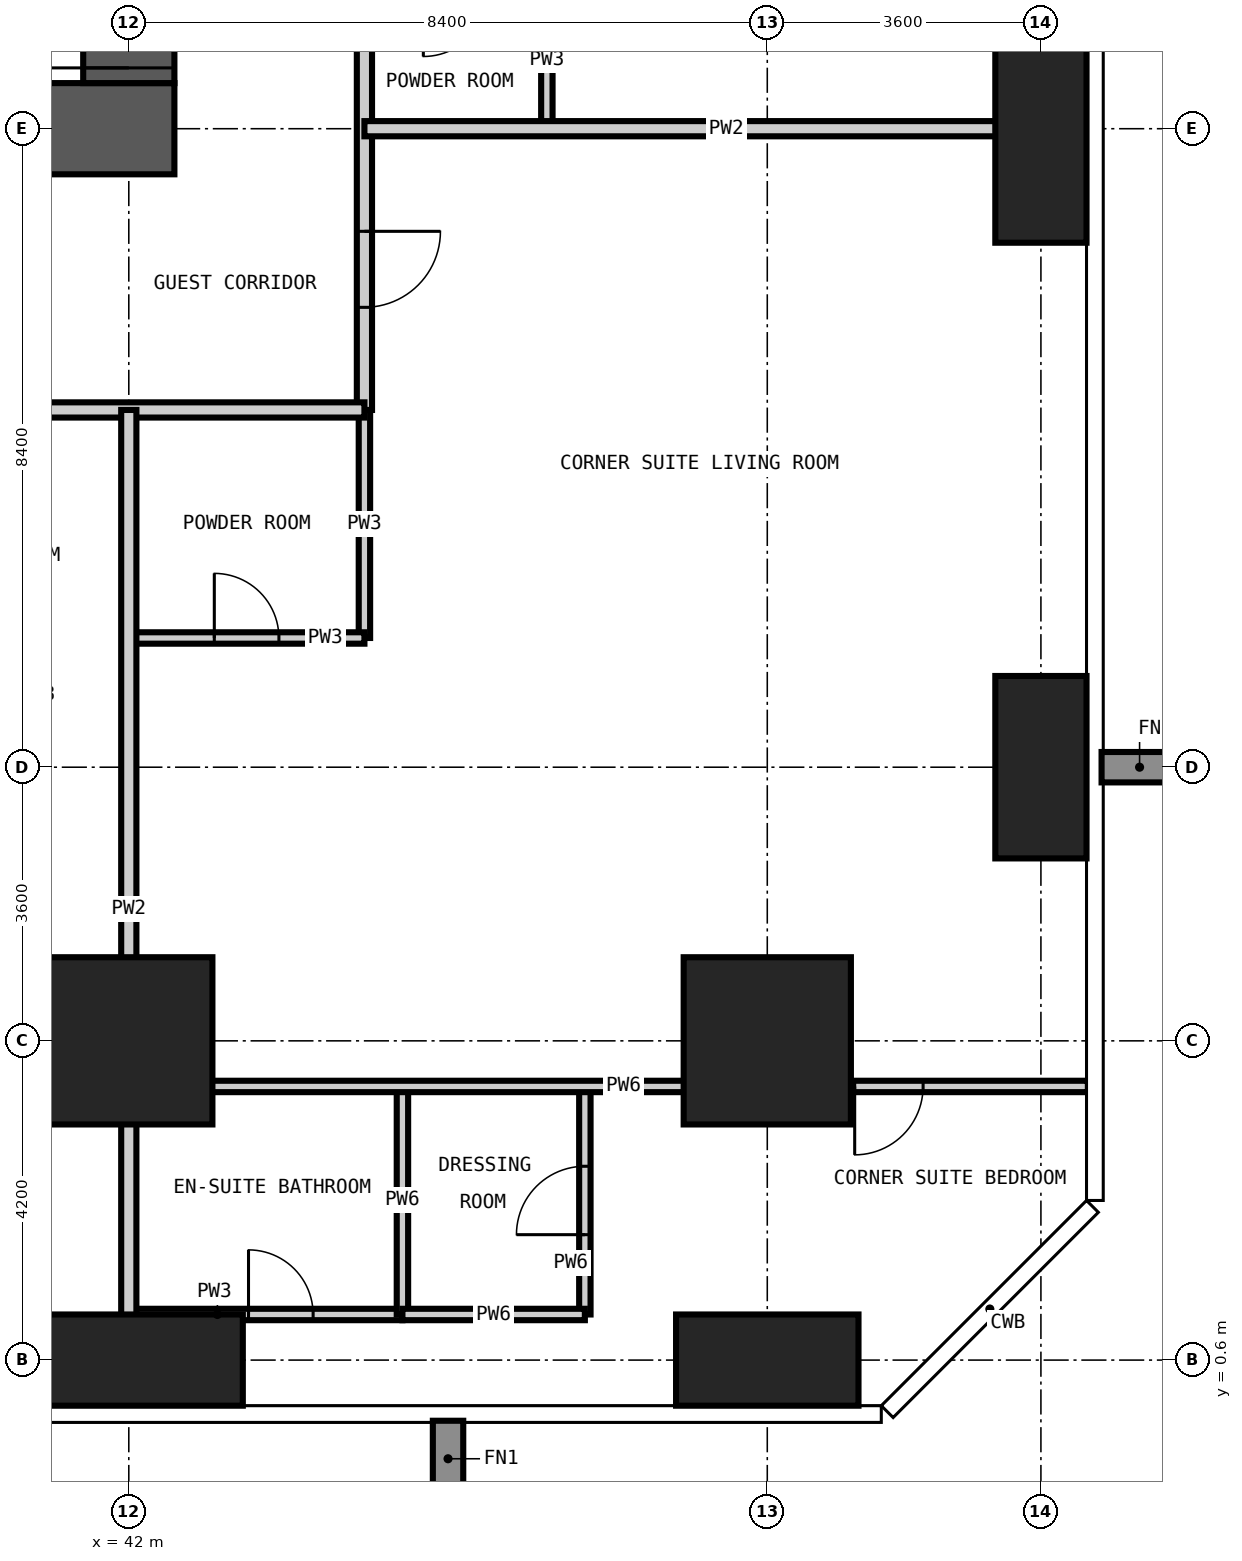
"""IFC4 building model, lengths in metres.
Left out: names, types, materials, properties, quantities, classifications, styles, units other than length and angle.
Written with IfcOpenShell. Run it as: python <this file> out.ifc"""

import sys

from ifc_helpers import new_model, si_unit, direction, frame, frame_2d, origin, origin_2d, place, context, subcontext, project, spatial, rectangle, extrude, element, fill, save


model = new_model("IFC4")
c1 = context("Model", 3, precision=1e-05, world=origin(), true_north=direction((0.0, 1.0)))
c2 = subcontext(c1, "Body", "Model", "MODEL_VIEW")
j1 = project(units=[si_unit("LENGTHUNIT", "METRE"), si_unit("PLANEANGLEUNIT", "RADIAN")], contexts=[c1])
p1 = place(None, origin())
s1 = spatial("IfcSite", under=j1, at=p1, CompositionType="ELEMENT")
p2 = place(p1, origin())
s2 = spatial("IfcBuilding", under=s1, at=p2, CompositionType="ELEMENT")
p3 = place(p2, frame((0.0, 0.0, 144.0)))
s3 = spatial("IfcBuildingStorey", under=s2, at=p3, CompositionType="ELEMENT", Elevation=144.0)
p4 = place(p3, frame((42.0, 0.6, -0.35), z_axis=(0.0, 0.0, 1.0), x_axis=(1.0, 0.0, 0.0)))
e1 = element("IfcColumn", 1, at=p4, inside=s3, PredefinedType="COLUMN", context=c2, shape_type="SweptSolid", body=[
    extrude(rectangle(XDim=3.0, YDim=1.2, at=origin_2d()), origin(), (0.0, 0.0, 1.0), 3.6),
])
p5 = place(p3, frame((42.0, 4.8, -0.35), z_axis=(0.0, 0.0, 1.0), x_axis=(1.0, 0.0, 0.0)))
e2 = element("IfcColumn", 2, at=p5, inside=s3, PredefinedType="COLUMN", context=c2, shape_type="SweptSolid", body=[
    extrude(rectangle(XDim=2.2, YDim=2.2, at=origin_2d()), origin(), (0.0, 0.0, 1.0), 3.6),
])
p6 = place(p3, frame((50.4, 0.6, -0.35), z_axis=(0.0, 0.0, 1.0), x_axis=(1.0, 0.0, 0.0)))
e3 = element("IfcColumn", 3, at=p6, inside=s3, PredefinedType="COLUMN", context=c2, shape_type="SweptSolid", body=[
    extrude(rectangle(XDim=2.4, YDim=1.2, at=origin_2d()), origin(), (0.0, 0.0, 1.0), 3.6),
])
p7 = place(p3, frame((50.4, 4.8, -0.35), z_axis=(0.0, 0.0, 1.0), x_axis=(1.0, 0.0, 0.0)))
e4 = element("IfcColumn", 4, at=p7, inside=s3, PredefinedType="COLUMN", context=c2, shape_type="SweptSolid", body=[
    extrude(rectangle(XDim=2.2, YDim=2.2, at=origin_2d()), origin(), (0.0, 0.0, 1.0), 3.6),
])
p8 = place(p3, frame((54.0, 8.4, -0.35), z_axis=(0.0, 0.0, 1.0), x_axis=(1.0, 0.0, 0.0)))
e5 = element("IfcColumn", 5, at=p8, inside=s3, PredefinedType="COLUMN", context=c2, shape_type="SweptSolid", body=[
    extrude(rectangle(XDim=1.2, YDim=2.4, at=origin_2d()), origin(), (0.0, 0.0, 1.0), 3.6),
])
p9 = place(p3, frame((54.0, 16.8, -0.35), z_axis=(0.0, 0.0, 1.0), x_axis=(1.0, 0.0, 0.0)))
e6 = element("IfcColumn", 6, at=p9, inside=s3, PredefinedType="COLUMN", context=c2, shape_type="SweptSolid", body=[
    extrude(rectangle(XDim=1.2, YDim=3.0, at=origin_2d()), origin(), (0.0, 0.0, 1.0), 3.6),
])
p10 = place(p3, frame((16.2, 16.8, -0.35), z_axis=(0.0, 0.0, 1.0), x_axis=(1.0, 0.0, 0.0)))
e7 = element("IfcWall", 7, at=p10, inside=s3, PredefinedType="SHEAR", context=c2, shape_type="SweptSolid", body=[
    extrude(rectangle(XDim=26.4, YDim=1.2, at=frame_2d((13.2, 0.0))), origin(), (0.0, 0.0, 1.0), 3.6),
])
p11 = place(p10, frame((12.7, 0.0, 0.35)))
e8 = element("IfcOpeningElement", 8, at=p11, cuts=e7, PredefinedType="OPENING", context=c2, shape_type="SweptSolid", body=[
    extrude(rectangle(XDim=1.0, YDim=2.1, at=frame_2d((0.5, 1.05))), frame((0.0, 0.61, 0.0), z_axis=(0.0, -1.0, 0.0), x_axis=(1.0, 0.0, 0.0)), (0.0, 0.0, 1.0), 1.22),
])
p12 = place(p10, frame((19.0, 0.0, 0.35)))
e9 = element("IfcOpeningElement", 9, at=p12, cuts=e7, PredefinedType="OPENING", context=c2, shape_type="SweptSolid", body=[
    extrude(rectangle(XDim=1.0, YDim=2.1, at=frame_2d((0.5, 1.05))), frame((0.0, 0.61, 0.0), z_axis=(0.0, -1.0, 0.0), x_axis=(1.0, 0.0, 0.0)), (0.0, 0.0, 1.0), 1.22),
])
p13 = place(p3, frame((42.0, 17.4, -0.35), z_axis=(0.0, 0.0, 1.0), x_axis=(0.0, 1.0, 0.0)))
e10 = element("IfcWall", 10, at=p13, inside=s3, PredefinedType="SHEAR", context=c2, shape_type="SweptSolid", body=[
    extrude(rectangle(XDim=24.0, YDim=1.2, at=frame_2d((12.0, 0.0))), origin(), (0.0, 0.0, 1.0), 3.6),
])
p14 = place(p13, frame((0.2, 0.0, 0.35)))
e11 = element("IfcOpeningElement", 11, at=p14, cuts=e10, PredefinedType="OPENING", context=c2, shape_type="SweptSolid", body=[
    extrude(rectangle(XDim=1.2, YDim=2.2, at=frame_2d((0.6, 1.1))), frame((0.0, 0.61, 0.0), z_axis=(0.0, -1.0, 0.0), x_axis=(1.0, 0.0, 0.0)), (0.0, 0.0, 1.0), 1.22),
])
p15 = place(p13, frame((11.1, 0.0, 0.35)))
e12 = element("IfcOpeningElement", 12, at=p15, cuts=e10, PredefinedType="OPENING", context=c2, shape_type="SweptSolid", body=[
    extrude(rectangle(XDim=1.8, YDim=2.2, at=frame_2d((0.9, 1.1))), frame((0.0, 0.61, 0.0), z_axis=(0.0, -1.0, 0.0), x_axis=(1.0, 0.0, 0.0)), (0.0, 0.0, 1.0), 1.22),
])
p16 = place(p13, frame((19.9, 0.0, 0.35)))
e13 = element("IfcOpeningElement", 13, at=p16, cuts=e10, PredefinedType="OPENING", context=c2, shape_type="SweptSolid", body=[
    extrude(rectangle(XDim=1.0, YDim=2.1, at=frame_2d((0.5, 1.05))), frame((0.0, 0.61, 0.0), z_axis=(0.0, -1.0, 0.0), x_axis=(1.0, 0.0, 0.0)), (0.0, 0.0, 1.0), 1.22),
])
p17 = place(p3, frame((45.1, 10.1, 0.0), z_axis=(0.0, 0.0, 1.0), x_axis=(0.0, 1.0, 0.0)))
e14 = element("IfcWall", 14, at=p17, inside=s3, PredefinedType="PARTITIONING", context=c2, shape_type="SweptSolid", body=[
    extrude(rectangle(XDim=3.0, YDim=0.15, at=frame_2d((1.5, 0.0))), origin(), (0.0, 0.0, 1.0), 3.25),
])
p18 = place(p3, frame((47.5, 16.8, 0.0), z_axis=(0.0, 0.0, 1.0), x_axis=(0.0, 1.0, 0.0)))
e15 = element("IfcWall", 15, at=p18, inside=s3, PredefinedType="PARTITIONING", context=c2, shape_type="SweptSolid", body=[
    extrude(rectangle(XDim=1.8, YDim=0.15, at=frame_2d((0.9, 0.0))), origin(), (0.0, 0.0, 1.0), 3.25),
])
p19 = place(p3, frame((42.0, 1.2, 0.0), z_axis=(0.0, 0.0, 1.0), x_axis=(1.0, 0.0, 0.0)))
e16 = element("IfcWall", 16, at=p19, inside=s3, PredefinedType="PARTITIONING", context=c2, shape_type="SweptSolid", body=[
    extrude(rectangle(XDim=3.6, YDim=0.15, at=frame_2d((1.8, 0.0))), origin(), (0.0, 0.0, 1.0), 3.25),
])
p20 = place(p19, frame((1.575, 0.0, 0.0)))
e17 = element("IfcOpeningElement", 17, at=p20, cuts=e16, PredefinedType="OPENING", context=c2, shape_type="SweptSolid", body=[
    extrude(rectangle(XDim=0.85, YDim=2.1, at=frame_2d((0.425, 1.05))), frame((0.0, 0.085, 0.0), z_axis=(0.0, -1.0, 0.0), x_axis=(1.0, 0.0, 0.0)), (0.0, 0.0, 1.0), 0.17),
])
p21 = place(p3, frame((42.0, 10.1, 0.0), z_axis=(0.0, 0.0, 1.0), x_axis=(1.0, 0.0, 0.0)))
e18 = element("IfcWall", 18, at=p21, inside=s3, PredefinedType="PARTITIONING", context=c2, shape_type="SweptSolid", body=[
    extrude(rectangle(XDim=3.1, YDim=0.15, at=frame_2d((1.55, 0.0))), origin(), (0.0, 0.0, 1.0), 3.25),
])
p22 = place(p21, frame((1.125, 0.0, 0.0)))
e19 = element("IfcOpeningElement", 19, at=p22, cuts=e18, PredefinedType="OPENING", context=c2, shape_type="SweptSolid", body=[
    extrude(rectangle(XDim=0.85, YDim=2.1, at=frame_2d((0.425, 1.05))), frame((0.0, 0.085, 0.0), z_axis=(0.0, -1.0, 0.0), x_axis=(1.0, 0.0, 0.0)), (0.0, 0.0, 1.0), 0.17),
])
p23 = place(p3, frame((45.1, 44.5, 0.0), z_axis=(0.0, 0.0, 1.0), x_axis=(0.0, -1.0, 0.0)))
e20 = element("IfcWall", 20, at=p23, inside=s3, PredefinedType="PARTITIONING", context=c2, shape_type="SweptSolid", body=[
    extrude(rectangle(XDim=31.4, YDim=0.2, at=frame_2d((15.7, 0.0))), origin(), (0.0, 0.0, 1.0), 3.25),
])
p24 = place(p23, frame((24.2, 0.0, 0.0)))
e21 = element("IfcOpeningElement", 21, at=p24, cuts=e20, PredefinedType="OPENING", context=c2, shape_type="SweptSolid", body=[
    extrude(rectangle(XDim=1.0, YDim=2.2, at=frame_2d((0.5, 1.1))), frame((0.0, 0.11, 0.0), z_axis=(0.0, -1.0, 0.0), x_axis=(1.0, 0.0, 0.0)), (0.0, 0.0, 1.0), 0.22),
])
p25 = place(p23, frame((13.4, 0.0, 0.0)))
e22 = element("IfcOpeningElement", 22, at=p25, cuts=e20, PredefinedType="OPENING", context=c2, shape_type="SweptSolid", body=[
    extrude(rectangle(XDim=1.0, YDim=2.2, at=frame_2d((0.5, 1.1))), frame((0.0, 0.11, 0.0), z_axis=(0.0, -1.0, 0.0), x_axis=(1.0, 0.0, 0.0)), (0.0, 0.0, 1.0), 0.22),
])
p26 = place(p23, frame((7.4, 0.0, 0.0)))
e23 = element("IfcOpeningElement", 23, at=p26, cuts=e20, PredefinedType="OPENING", context=c2, shape_type="SweptSolid", body=[
    extrude(rectangle(XDim=1.0, YDim=2.2, at=frame_2d((0.5, 1.1))), frame((0.0, 0.11, 0.0), z_axis=(0.0, -1.0, 0.0), x_axis=(1.0, 0.0, 0.0)), (0.0, 0.0, 1.0), 0.22),
])
p27 = place(p23, frame((29.05, 0.0, 0.0)))
e24 = element("IfcOpeningElement", 24, at=p27, cuts=e20, PredefinedType="OPENING", context=c2, shape_type="SweptSolid", body=[
    extrude(rectangle(XDim=1.0, YDim=2.2, at=frame_2d((0.5, 1.1))), frame((0.0, 0.11, 0.0), z_axis=(0.0, -1.0, 0.0), x_axis=(1.0, 0.0, 0.0)), (0.0, 0.0, 1.0), 0.22),
])
p28 = place(p23, frame((0.75, 0.0, 0.0)))
e25 = element("IfcOpeningElement", 25, at=p28, cuts=e20, PredefinedType="OPENING", context=c2, shape_type="SweptSolid", body=[
    extrude(rectangle(XDim=1.0, YDim=2.2, at=frame_2d((0.5, 1.1))), frame((0.0, 0.11, 0.0), z_axis=(0.0, -1.0, 0.0), x_axis=(1.0, 0.0, 0.0)), (0.0, 0.0, 1.0), 0.22),
])
p29 = place(p3, frame((45.1, 13.1, 0.0), z_axis=(0.0, 0.0, 1.0), x_axis=(-1.0, 0.0, 0.0)))
e26 = element("IfcWall", 26, at=p29, inside=s3, PredefinedType="PARTITIONING", context=c2, shape_type="SweptSolid", body=[
    extrude(rectangle(XDim=24.1, YDim=0.2, at=frame_2d((12.05, 0.0))), origin(), (0.0, 0.0, 1.0), 3.25),
])
p30 = place(p29, frame((21.5, 0.0, 0.0)))
e27 = element("IfcOpeningElement", 27, at=p30, cuts=e26, PredefinedType="OPENING", context=c2, shape_type="SweptSolid", body=[
    extrude(rectangle(XDim=1.0, YDim=2.2, at=frame_2d((0.5, 1.1))), frame((0.0, 0.11, 0.0), z_axis=(0.0, -1.0, 0.0), x_axis=(1.0, 0.0, 0.0)), (0.0, 0.0, 1.0), 0.22),
])
p31 = place(p29, frame((17.3, 0.0, 0.0)))
e28 = element("IfcOpeningElement", 28, at=p31, cuts=e26, PredefinedType="OPENING", context=c2, shape_type="SweptSolid", body=[
    extrude(rectangle(XDim=1.0, YDim=2.2, at=frame_2d((0.5, 1.1))), frame((0.0, 0.11, 0.0), z_axis=(0.0, -1.0, 0.0), x_axis=(1.0, 0.0, 0.0)), (0.0, 0.0, 1.0), 0.22),
])
p32 = place(p29, frame((11.0, 0.0, 0.0)))
e29 = element("IfcOpeningElement", 29, at=p32, cuts=e26, PredefinedType="OPENING", context=c2, shape_type="SweptSolid", body=[
    extrude(rectangle(XDim=1.0, YDim=2.2, at=frame_2d((0.5, 1.1))), frame((0.0, 0.11, 0.0), z_axis=(0.0, -1.0, 0.0), x_axis=(1.0, 0.0, 0.0)), (0.0, 0.0, 1.0), 0.22),
])
p33 = place(p29, frame((4.7, 0.0, 0.0)))
e30 = element("IfcOpeningElement", 30, at=p33, cuts=e26, PredefinedType="OPENING", context=c2, shape_type="SweptSolid", body=[
    extrude(rectangle(XDim=1.0, YDim=2.2, at=frame_2d((0.5, 1.1))), frame((0.0, 0.11, 0.0), z_axis=(0.0, -1.0, 0.0), x_axis=(1.0, 0.0, 0.0)), (0.0, 0.0, 1.0), 0.22),
])
p34 = place(p3, frame((42.0, -0.018, 0.0), z_axis=(0.0, 0.0, 1.0), x_axis=(0.0, 1.0, 0.0)))
e31 = element("IfcWall", 31, at=p34, inside=s3, PredefinedType="PARTITIONING", context=c2, shape_type="SweptSolid", body=[
    extrude(rectangle(XDim=13.118, YDim=0.2, at=frame_2d((6.559, 0.0))), origin(), (0.0, 0.0, 1.0), 3.25),
])
p35 = place(p3, frame((45.1, 16.8, 0.0), z_axis=(0.0, 0.0, 1.0), x_axis=(1.0, 0.0, 0.0)))
e32 = element("IfcWall", 32, at=p35, inside=s3, PredefinedType="PARTITIONING", context=c2, shape_type="SweptSolid", body=[
    extrude(rectangle(XDim=9.518, YDim=0.2, at=frame_2d((4.759, 0.0))), origin(), (0.0, 0.0, 1.0), 3.25),
])
p36 = place(p3, frame((45.6, 1.2, 0.0), z_axis=(0.0, 0.0, 1.0), x_axis=(0.0, 1.0, 0.0)))
e33 = element("IfcWall", 33, at=p36, inside=s3, PredefinedType="PARTITIONING", context=c2, shape_type="SweptSolid", body=[
    extrude(rectangle(XDim=3.0, YDim=0.15, at=frame_2d((1.5, 0.0))), origin(), (0.0, 0.0, 1.0), 3.25),
])
p37 = place(p3, frame((48.0, 1.2, 0.0), z_axis=(0.0, 0.0, 1.0), x_axis=(0.0, 1.0, 0.0)))
e34 = element("IfcWall", 34, at=p37, inside=s3, PredefinedType="PARTITIONING", context=c2, shape_type="SweptSolid", body=[
    extrude(rectangle(XDim=3.0, YDim=0.15, at=frame_2d((1.5, 0.0))), origin(), (0.0, 0.0, 1.0), 3.25),
])
p38 = place(p37, frame((1.05, 0.0, 0.0)))
e35 = element("IfcOpeningElement", 35, at=p38, cuts=e34, PredefinedType="OPENING", context=c2, shape_type="SweptSolid", body=[
    extrude(rectangle(XDim=0.9, YDim=2.1, at=frame_2d((0.45, 1.05))), frame((0.0, 0.085, 0.0), z_axis=(0.0, -1.0, 0.0), x_axis=(1.0, 0.0, 0.0)), (0.0, 0.0, 1.0), 0.17),
])
p39 = place(p3, frame((45.6, 1.2, 0.0), z_axis=(0.0, 0.0, 1.0), x_axis=(1.0, 0.0, 0.0)))
e36 = element("IfcWall", 36, at=p39, inside=s3, PredefinedType="PARTITIONING", context=c2, shape_type="SweptSolid", body=[
    extrude(rectangle(XDim=2.4, YDim=0.15, at=frame_2d((1.2, 0.0))), origin(), (0.0, 0.0, 1.0), 3.25),
])
p40 = place(p3, frame((42.0, 4.2, 0.0), z_axis=(0.0, 0.0, 1.0), x_axis=(1.0, 0.0, 0.0)))
e37 = element("IfcWall", 37, at=p40, inside=s3, PredefinedType="PARTITIONING", context=c2, shape_type="SweptSolid", body=[
    extrude(rectangle(XDim=12.618, YDim=0.15, at=frame_2d((6.309, 0.0))), origin(), (0.0, 0.0, 1.0), 3.25),
])
p41 = place(p40, frame((9.55, 0.0, 0.0)))
e38 = element("IfcOpeningElement", 38, at=p41, cuts=e37, PredefinedType="OPENING", context=c2, shape_type="SweptSolid", body=[
    extrude(rectangle(XDim=0.9, YDim=2.1, at=frame_2d((0.45, 1.05))), frame((0.0, 0.085, 0.0), z_axis=(0.0, -1.0, 0.0), x_axis=(1.0, 0.0, 0.0)), (0.0, 0.0, 1.0), 0.17),
])
p42 = place(p14, origin())
e39 = element("IfcDoor", 39, at=p42, inside=s3, OperationType="SINGLE_SWING_LEFT", PredefinedType="DOOR", context=c2, shape_type="SweptSolid", body=[
    extrude(rectangle(XDim=1.2, YDim=2.2, at=frame_2d((0.6, 1.1))), frame((0.0, 0.025, 0.0), z_axis=(0.0, -1.0, 0.0), x_axis=(1.0, 0.0, 0.0)), (0.0, 0.0, 1.0), 0.05),
])
fill(e11, e39)
p43 = place(p27, origin())
e40 = element("IfcDoor", 40, at=p43, inside=s3, OperationType="SINGLE_SWING_LEFT", PredefinedType="DOOR", context=c2, shape_type="SweptSolid", body=[
    extrude(rectangle(XDim=1.0, YDim=2.2, at=frame_2d((0.5, 1.1))), frame((0.0, 0.025, 0.0), z_axis=(0.0, -1.0, 0.0), x_axis=(1.0, 0.0, 0.0)), (0.0, 0.0, 1.0), 0.05),
])
fill(e24, e40)
p44 = place(p22, origin())
e41 = element("IfcDoor", 41, at=p44, inside=s3, OperationType="SINGLE_SWING_LEFT", PredefinedType="DOOR", context=c2, shape_type="SweptSolid", body=[
    extrude(rectangle(XDim=0.85, YDim=2.1, at=frame_2d((0.425, 1.05))), frame((0.0, 0.025, 0.0), z_axis=(0.0, -1.0, 0.0), x_axis=(1.0, 0.0, 0.0)), (0.0, 0.0, 1.0), 0.05),
])
fill(e19, e41)
p45 = place(p41, frame((0.9, 0.0, 0.0), z_axis=(0.0, 0.0, 1.0), x_axis=(-1.0, 0.0, 0.0)))
e42 = element("IfcDoor", 42, at=p45, inside=s3, OperationType="SINGLE_SWING_RIGHT", PredefinedType="DOOR", context=c2, shape_type="SweptSolid", body=[
    extrude(rectangle(XDim=0.9, YDim=2.1, at=frame_2d((0.45, 1.05))), frame((0.0, 0.025, 0.0), z_axis=(0.0, -1.0, 0.0), x_axis=(1.0, 0.0, 0.0)), (0.0, 0.0, 1.0), 0.05),
])
fill(e38, e42)
p46 = place(p20, origin())
e43 = element("IfcDoor", 43, at=p46, inside=s3, OperationType="SINGLE_SWING_LEFT", PredefinedType="DOOR", context=c2, shape_type="SweptSolid", body=[
    extrude(rectangle(XDim=0.85, YDim=2.1, at=frame_2d((0.425, 1.05))), frame((0.0, 0.025, 0.0), z_axis=(0.0, -1.0, 0.0), x_axis=(1.0, 0.0, 0.0)), (0.0, 0.0, 1.0), 0.05),
])
fill(e17, e43)
p47 = place(p38, origin())
e44 = element("IfcDoor", 44, at=p47, inside=s3, OperationType="SINGLE_SWING_LEFT", PredefinedType="DOOR", context=c2, shape_type="SweptSolid", body=[
    extrude(rectangle(XDim=0.9, YDim=2.1, at=frame_2d((0.45, 1.05))), frame((0.0, 0.025, 0.0), z_axis=(0.0, -1.0, 0.0), x_axis=(1.0, 0.0, 0.0)), (0.0, 0.0, 1.0), 0.05),
])
fill(e35, e44)
save(model, sys.argv[1])
